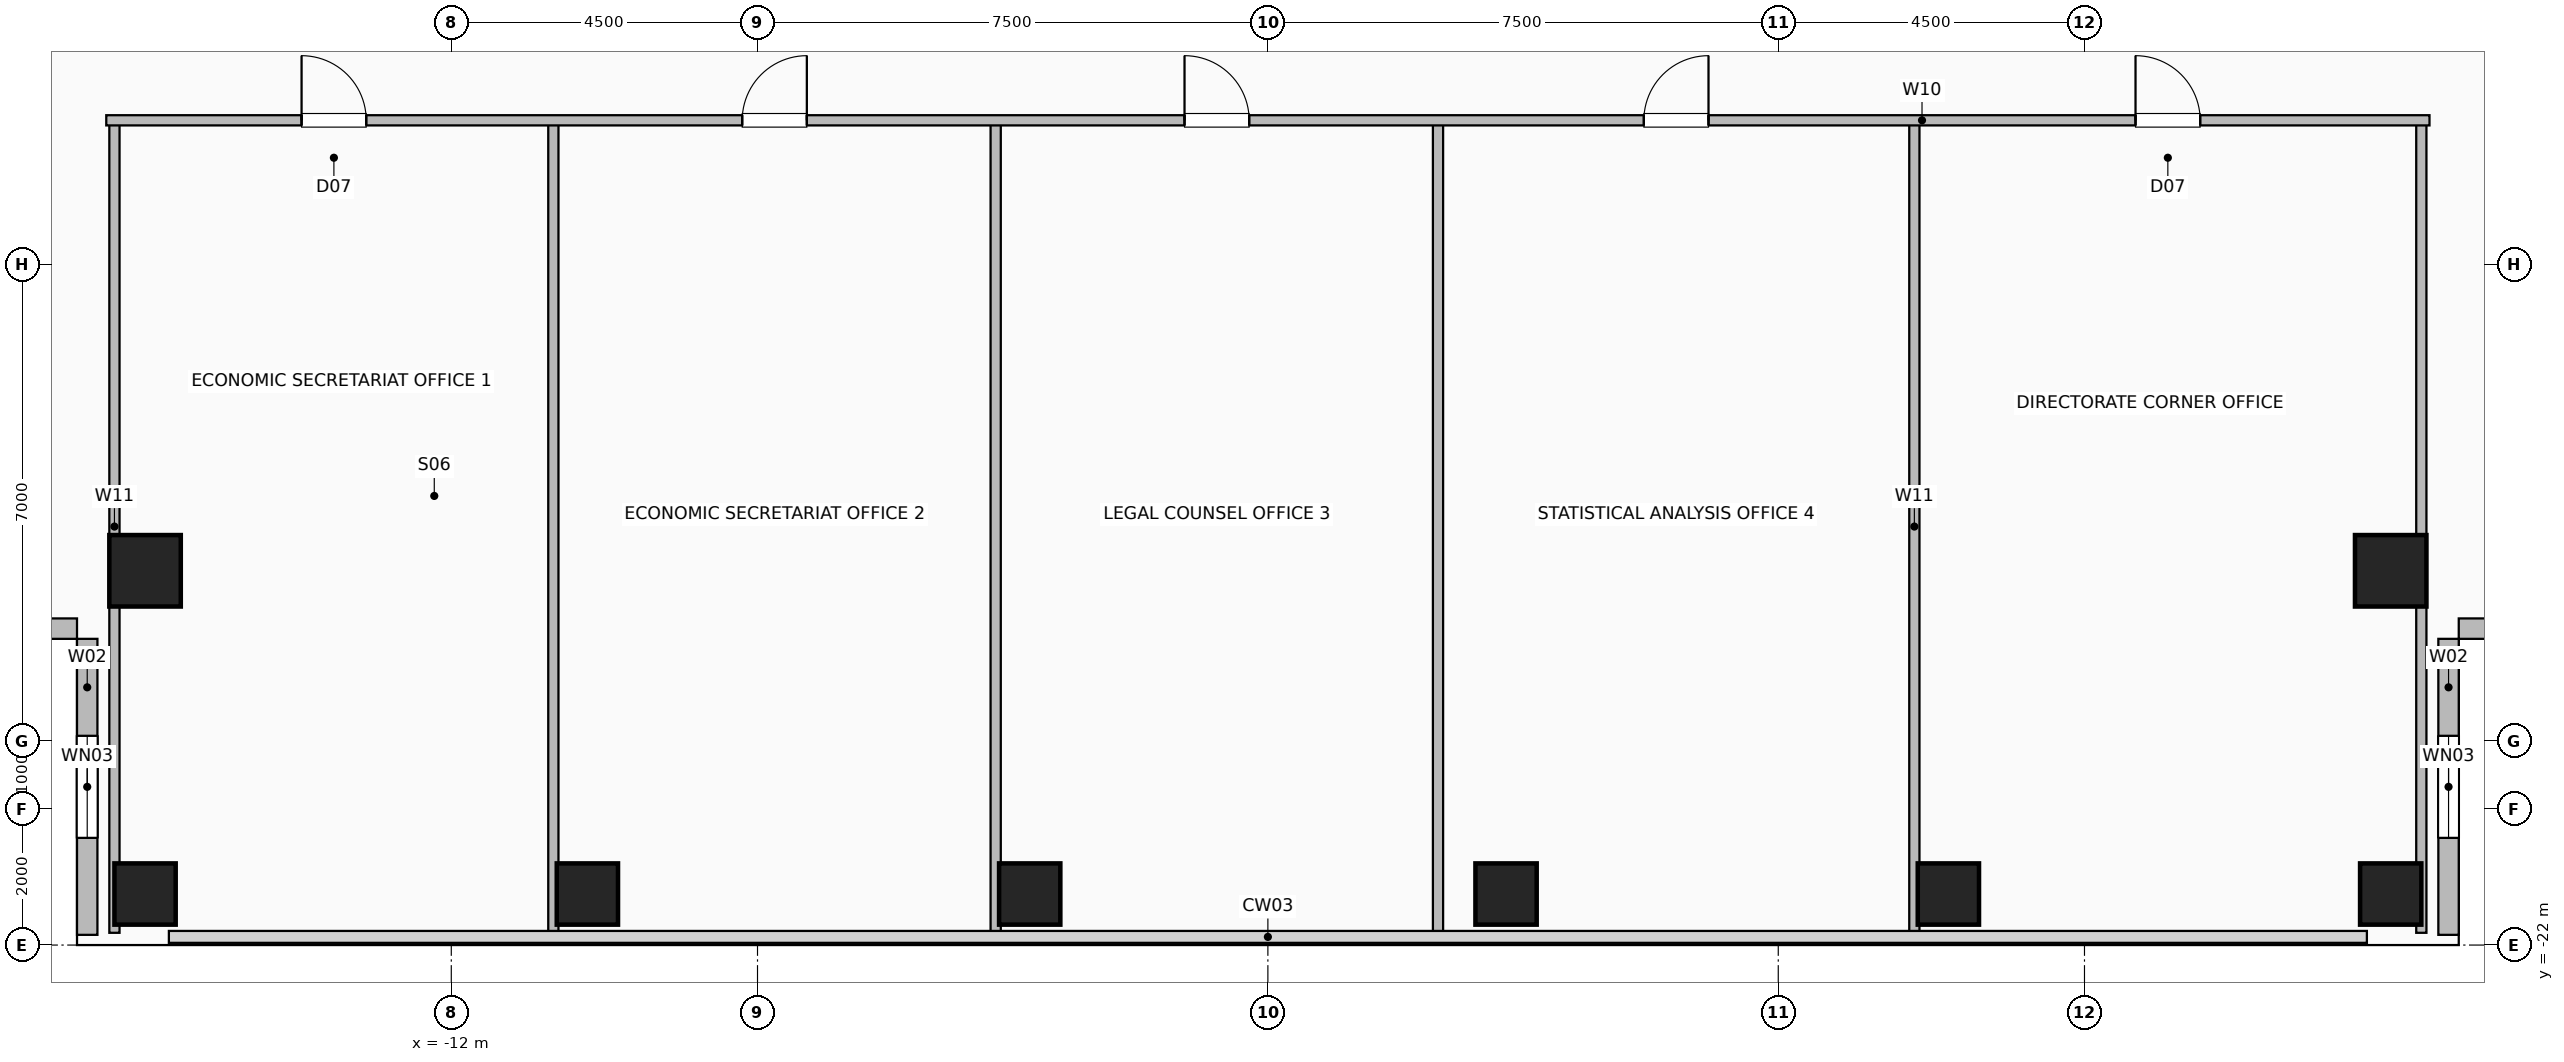
"""IFC4 building model, lengths in metres.
Left out: names, types, materials, properties, quantities, classifications, styles, units other than length and angle.
Written with IfcOpenShell. Run it as: python <this file> out.ifc"""

import sys

from ifc_helpers import new_model, si_unit, direction, frame, frame_2d, origin, origin_2d, place, context, subcontext, project, spatial, rectangle, hollow_rectangle, extrude, element, fill, save


model = new_model("IFC4")
c1 = context("Model", 3, precision=1e-05, world=origin(), true_north=direction((0.0, 1.0)))
c2 = subcontext(c1, "Body", "Model", "MODEL_VIEW")
j1 = project(units=[si_unit("LENGTHUNIT", "METRE"), si_unit("PLANEANGLEUNIT", "RADIAN")], contexts=[c1])
p1 = place(None, origin())
s1 = spatial("IfcSite", under=j1, at=p1, CompositionType="ELEMENT")
p2 = place(p1, origin())
s2 = spatial("IfcBuilding", under=s1, at=p2, CompositionType="ELEMENT")
p3 = place(p2, frame((0.0, 0.0, 108.4)))
s3 = spatial("IfcBuildingStorey", under=s2, at=p3, CompositionType="ELEMENT", Elevation=108.4)
for number, where, z_axis, x_axis in (
    (1, (-16.5, -21.25, 0.0), (0.0, 0.0, 1.0), (1.0, 0.0, 0.0)),
    (2, (-10.0, -21.25, 0.0), (0.0, 0.0, 1.0), (1.0, 0.0, 0.0)),
    (3, (-3.5, -21.25, 0.0), (0.0, 0.0, 1.0), (1.0, 0.0, 0.0)),
    (4, (3.5, -21.25, 0.0), (0.0, 0.0, 1.0), (1.0, 0.0, 0.0)),
    (5, (10.0, -21.25, 0.0), (0.0, 0.0, 1.0), (1.0, 0.0, 0.0)),
    (6, (16.5, -21.25, 0.0), (0.0, 0.0, 1.0), (1.0, 0.0, 0.0)),
):
    element("IfcColumn", number, at=place(p3, frame(where, z_axis=z_axis, x_axis=x_axis)), inside=s3, PredefinedType="COLUMN", context=c2, shape_type="SweptSolid", body=[
        extrude(hollow_rectangle(XDim=0.9, YDim=0.9, WallThickness=0.045, at=origin_2d()), origin(), (0.0, 0.0, 1.0), 3.6),
    ])
for number, where, z_axis, x_axis in (
    (7, (-16.5, -16.5, 0.0), (0.0, 0.0, 1.0), (1.0, 0.0, 0.0)),
    (8, (16.5, -16.5, 0.0), (0.0, 0.0, 1.0), (1.0, 0.0, 0.0)),
):
    element("IfcColumn", number, at=place(p3, frame(where, z_axis=z_axis, x_axis=x_axis)), inside=s3, PredefinedType="COLUMN", context=c2, shape_type="SweptSolid", body=[
        extrude(hollow_rectangle(XDim=1.05, YDim=1.05, WallThickness=0.05, at=origin_2d()), origin(), (0.0, 0.0, 1.0), 3.6),
    ])
p4 = place(p3, frame((-17.35, -21.85, 0.0), z_axis=(0.0, 0.0, 1.0), x_axis=(0.0, 1.0, 0.0)))
e9 = element("IfcWall", 9, at=p4, inside=s3, PredefinedType="SOLIDWALL", context=c2, shape_type="SweptSolid", body=[
    extrude(rectangle(XDim=4.35, YDim=0.3, at=frame_2d((2.175, 0.0))), origin(), (0.0, 0.0, 1.0), 3.36),
])
p5 = place(p4, frame((1.425, 0.0, 0.9)))
e10 = element("IfcOpeningElement", 10, at=p5, cuts=e9, PredefinedType="OPENING", context=c2, shape_type="SweptSolid", body=[
    extrude(rectangle(XDim=1.5, YDim=1.8, at=frame_2d((0.75, 0.9))), frame((0.0, 0.16, 0.0), z_axis=(0.0, -1.0, 0.0), x_axis=(1.0, 0.0, 0.0)), (0.0, 0.0, 1.0), 0.32),
])
p6 = place(p3, frame((-21.85, -17.35, 0.0), z_axis=(0.0, 0.0, 1.0), x_axis=(1.0, 0.0, 0.0)))
e11 = element("IfcWall", 11, at=p6, inside=s3, PredefinedType="SOLIDWALL", context=c2, shape_type="SweptSolid", body=[
    extrude(rectangle(XDim=4.35, YDim=0.3, at=frame_2d((2.175, 0.0))), origin(), (0.0, 0.0, 1.0), 3.36),
])
p7 = place(p3, frame((17.35, -21.85, 0.0), z_axis=(0.0, 0.0, 1.0), x_axis=(0.0, 1.0, 0.0)))
e12 = element("IfcWall", 12, at=p7, inside=s3, PredefinedType="SOLIDWALL", context=c2, shape_type="SweptSolid", body=[
    extrude(rectangle(XDim=4.35, YDim=0.3, at=frame_2d((2.175, 0.0))), origin(), (0.0, 0.0, 1.0), 3.36),
])
p8 = place(p7, frame((1.425, 0.0, 0.9)))
e13 = element("IfcOpeningElement", 13, at=p8, cuts=e12, PredefinedType="OPENING", context=c2, shape_type="SweptSolid", body=[
    extrude(rectangle(XDim=1.5, YDim=1.8, at=frame_2d((0.75, 0.9))), frame((0.0, 0.16, 0.0), z_axis=(0.0, -1.0, 0.0), x_axis=(1.0, 0.0, 0.0)), (0.0, 0.0, 1.0), 0.32),
])
p9 = place(p3, frame((21.85, -17.35, 0.0), z_axis=(0.0, 0.0, 1.0), x_axis=(-1.0, 0.0, 0.0)))
e14 = element("IfcWall", 14, at=p9, inside=s3, PredefinedType="SOLIDWALL", context=c2, shape_type="SweptSolid", body=[
    extrude(rectangle(XDim=4.35, YDim=0.3, at=frame_2d((2.175, 0.0))), origin(), (0.0, 0.0, 1.0), 3.36),
])
for number, where, z_axis, x_axis in (
    (15, (-16.95, -21.82, 0.0), (0.0, 0.0, 1.0), (0.0, 1.0, 0.0)),
    (16, (-10.5, -21.82, 0.0), (0.0, 0.0, 1.0), (0.0, 1.0, 0.0)),
    (17, (-4.0, -21.82, 0.0), (0.0, 0.0, 1.0), (0.0, 1.0, 0.0)),
    (18, (2.5, -21.82, 0.0), (0.0, 0.0, 1.0), (0.0, 1.0, 0.0)),
    (19, (9.5, -21.82, 0.0), (0.0, 0.0, 1.0), (0.0, 1.0, 0.0)),
    (20, (16.95, -21.82, 0.0), (0.0, 0.0, 1.0), (0.0, 1.0, 0.0)),
):
    element("IfcWall", number, at=place(p3, frame(where, z_axis=z_axis, x_axis=x_axis)), inside=s3, PredefinedType="PARTITIONING", context=c2, shape_type="SweptSolid", body=[
        extrude(rectangle(XDim=11.94, YDim=0.15, at=frame_2d((5.97, 0.0))), origin(), (0.0, 0.0, 1.0), 3.36),
    ])
p10 = place(p3, frame((-17.07, -9.88, 0.0), z_axis=(0.0, 0.0, 1.0), x_axis=(1.0, 0.0, 0.0)))
e21 = element("IfcWall", 21, at=p10, inside=s3, PredefinedType="PARTITIONING", context=c2, shape_type="SweptSolid", body=[
    extrude(rectangle(XDim=34.14, YDim=0.15, at=frame_2d((17.07, 0.0))), origin(), (0.0, 0.0, 1.0), 3.36),
])
p11 = place(p10, frame((2.87, 0.0, 0.0)))
e22 = element("IfcOpeningElement", 22, at=p11, cuts=e21, PredefinedType="OPENING", context=c2, shape_type="SweptSolid", body=[
    extrude(rectangle(XDim=0.95, YDim=2.06, at=frame_2d((0.475, 1.03))), frame((0.0, 0.085, 0.0), z_axis=(0.0, -1.0, 0.0), x_axis=(1.0, 0.0, 0.0)), (0.0, 0.0, 1.0), 0.17),
])
p12 = place(p10, frame((9.345, 0.0, 0.0)))
e23 = element("IfcOpeningElement", 23, at=p12, cuts=e21, PredefinedType="OPENING", context=c2, shape_type="SweptSolid", body=[
    extrude(rectangle(XDim=0.95, YDim=2.06, at=frame_2d((0.475, 1.03))), frame((0.0, 0.085, 0.0), z_axis=(0.0, -1.0, 0.0), x_axis=(1.0, 0.0, 0.0)), (0.0, 0.0, 1.0), 0.17),
])
p13 = place(p10, frame((15.845, 0.0, 0.0)))
e24 = element("IfcOpeningElement", 24, at=p13, cuts=e21, PredefinedType="OPENING", context=c2, shape_type="SweptSolid", body=[
    extrude(rectangle(XDim=0.95, YDim=2.06, at=frame_2d((0.475, 1.03))), frame((0.0, 0.085, 0.0), z_axis=(0.0, -1.0, 0.0), x_axis=(1.0, 0.0, 0.0)), (0.0, 0.0, 1.0), 0.17),
])
p14 = place(p10, frame((22.595, 0.0, 0.0)))
e25 = element("IfcOpeningElement", 25, at=p14, cuts=e21, PredefinedType="OPENING", context=c2, shape_type="SweptSolid", body=[
    extrude(rectangle(XDim=0.95, YDim=2.06, at=frame_2d((0.475, 1.03))), frame((0.0, 0.085, 0.0), z_axis=(0.0, -1.0, 0.0), x_axis=(1.0, 0.0, 0.0)), (0.0, 0.0, 1.0), 0.17),
])
p15 = place(p10, frame((29.82, 0.0, 0.0)))
e26 = element("IfcOpeningElement", 26, at=p15, cuts=e21, PredefinedType="OPENING", context=c2, shape_type="SweptSolid", body=[
    extrude(rectangle(XDim=0.95, YDim=2.06, at=frame_2d((0.475, 1.03))), frame((0.0, 0.085, 0.0), z_axis=(0.0, -1.0, 0.0), x_axis=(1.0, 0.0, 0.0)), (0.0, 0.0, 1.0), 0.17),
])
p16 = place(p5, origin())
e27 = element("IfcWindow", 27, at=p16, inside=s3, PartitioningType="SINGLE_PANEL", PredefinedType="WINDOW", context=c2, shape_type="SweptSolid", body=[
    extrude(rectangle(XDim=1.5, YDim=1.8, at=frame_2d((0.75, 0.9))), frame((0.0, 0.03, 0.0), z_axis=(0.0, -1.0, 0.0), x_axis=(1.0, 0.0, 0.0)), (0.0, 0.0, 1.0), 0.06),
])
fill(e10, e27)
p17 = place(p8, origin())
e28 = element("IfcWindow", 28, at=p17, inside=s3, PartitioningType="SINGLE_PANEL", PredefinedType="WINDOW", context=c2, shape_type="SweptSolid", body=[
    extrude(rectangle(XDim=1.5, YDim=1.8, at=frame_2d((0.75, 0.9))), frame((0.0, 0.03, 0.0), z_axis=(0.0, -1.0, 0.0), x_axis=(1.0, 0.0, 0.0)), (0.0, 0.0, 1.0), 0.06),
])
fill(e13, e28)
p18 = place(p11, origin())
e29 = element("IfcDoor", 29, at=p18, inside=s3, OperationType="SINGLE_SWING_LEFT", PredefinedType="DOOR", context=c2, shape_type="SweptSolid", body=[
    extrude(rectangle(XDim=0.95, YDim=2.06, at=frame_2d((0.475, 1.03))), frame((0.0, 0.025, 0.0), z_axis=(0.0, -1.0, 0.0), x_axis=(1.0, 0.0, 0.0)), (0.0, 0.0, 1.0), 0.05),
])
fill(e22, e29)
p19 = place(p12, origin())
e30 = element("IfcDoor", 30, at=p19, inside=s3, OperationType="SINGLE_SWING_RIGHT", PredefinedType="DOOR", context=c2, shape_type="SweptSolid", body=[
    extrude(rectangle(XDim=0.95, YDim=2.06, at=frame_2d((0.475, 1.03))), frame((0.0, 0.025, 0.0), z_axis=(0.0, -1.0, 0.0), x_axis=(1.0, 0.0, 0.0)), (0.0, 0.0, 1.0), 0.05),
])
fill(e23, e30)
p20 = place(p13, origin())
e31 = element("IfcDoor", 31, at=p20, inside=s3, OperationType="SINGLE_SWING_LEFT", PredefinedType="DOOR", context=c2, shape_type="SweptSolid", body=[
    extrude(rectangle(XDim=0.95, YDim=2.06, at=frame_2d((0.475, 1.03))), frame((0.0, 0.025, 0.0), z_axis=(0.0, -1.0, 0.0), x_axis=(1.0, 0.0, 0.0)), (0.0, 0.0, 1.0), 0.05),
])
fill(e24, e31)
p21 = place(p14, origin())
e32 = element("IfcDoor", 32, at=p21, inside=s3, OperationType="SINGLE_SWING_RIGHT", PredefinedType="DOOR", context=c2, shape_type="SweptSolid", body=[
    extrude(rectangle(XDim=0.95, YDim=2.06, at=frame_2d((0.475, 1.03))), frame((0.0, 0.025, 0.0), z_axis=(0.0, -1.0, 0.0), x_axis=(1.0, 0.0, 0.0)), (0.0, 0.0, 1.0), 0.05),
])
fill(e25, e32)
p22 = place(p15, origin())
e33 = element("IfcDoor", 33, at=p22, inside=s3, OperationType="SINGLE_SWING_LEFT", PredefinedType="DOOR", context=c2, shape_type="SweptSolid", body=[
    extrude(rectangle(XDim=0.95, YDim=2.06, at=frame_2d((0.475, 1.03))), frame((0.0, 0.025, 0.0), z_axis=(0.0, -1.0, 0.0), x_axis=(1.0, 0.0, 0.0)), (0.0, 0.0, 1.0), 0.05),
])
fill(e26, e33)
save(model, sys.argv[1])
